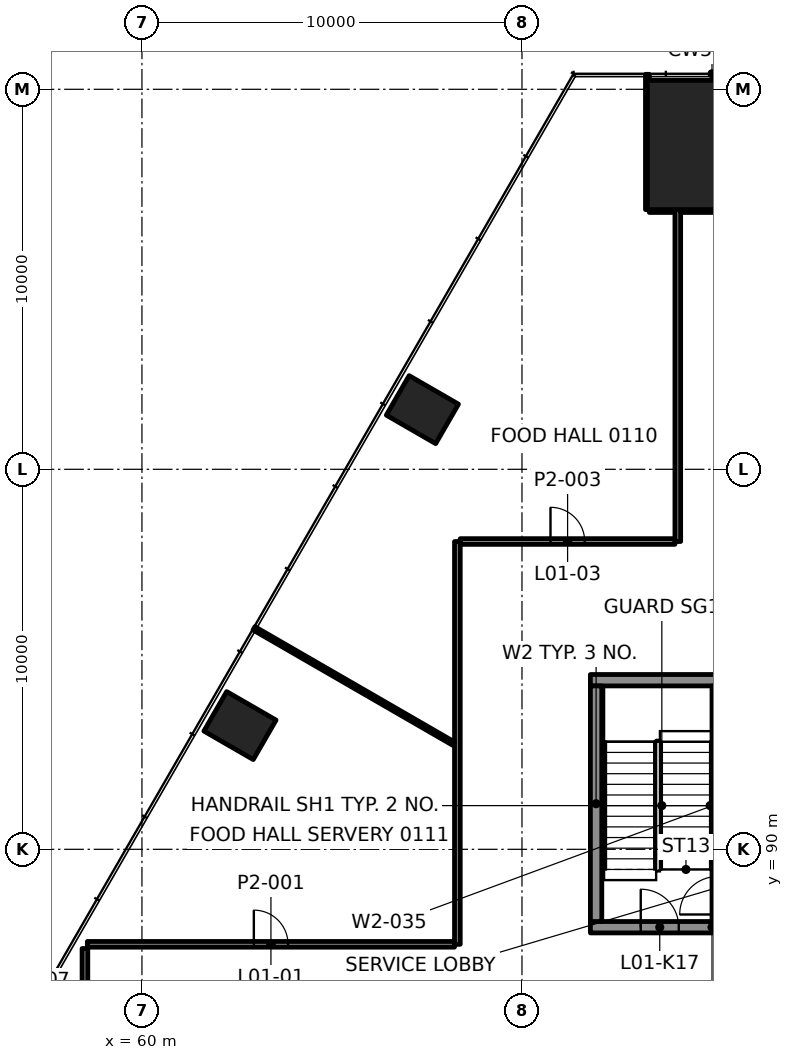
"""IFC4 building model, lengths in metres.
Left out: names, types, materials, properties, quantities, classifications, styles, units other than length and angle.
Written with IfcOpenShell. Run it as: python <this file> out.ifc"""

import sys

from ifc_helpers import new_model, si_unit, direction, frame, frame_2d, origin, origin_2d, place, context, subcontext, project, spatial, rectangle, extrude, element, fill, save


model = new_model("IFC4")
c1 = context("Model", 3, precision=1e-05, world=origin(), true_north=direction((0.0, 1.0)))
c2 = subcontext(c1, "Body", "Model", "MODEL_VIEW")
j1 = project(units=[si_unit("LENGTHUNIT", "METRE"), si_unit("PLANEANGLEUNIT", "RADIAN")], contexts=[c1])
p1 = place(None, origin())
s1 = spatial("IfcSite", under=j1, at=p1, CompositionType="ELEMENT")
p2 = place(p1, origin())
s2 = spatial("IfcBuilding", under=s1, at=p2, CompositionType="ELEMENT")
p3 = place(p2, frame((0.0, 0.0, 8.0)))
s3 = spatial("IfcBuildingStorey", under=s2, at=p3, CompositionType="ELEMENT", Elevation=8.0)
p4 = place(p3, frame((75.0, 108.534, 0.0), z_axis=(0.0, 0.0, 1.0), x_axis=(-1.0, 0.0, 0.0)))
e1 = element("IfcColumn", 1, at=p4, inside=s3, PredefinedType="COLUMN", context=c2, shape_type="SweptSolid", body=[
    extrude(rectangle(XDim=3.4, YDim=3.4, at=origin_2d()), origin(), (0.0, 0.0, 1.0), 4.6),
])
for number, where, z_axis, x_axis in (
    (2, (67.379, 101.57, -0.0), (0.0, 0.0, 1.0), (-0.5, -0.866, 0.0)),
    (3, (62.579, 93.256, -0.0), (0.0, 0.0, 1.0), (-0.5, -0.866, 0.0)),
):
    element("IfcColumn", number, at=place(p3, frame(where, z_axis=z_axis, x_axis=x_axis)), inside=s3, PredefinedType="COLUMN", context=c2, shape_type="SweptSolid", body=[
        extrude(rectangle(XDim=1.2, YDim=1.5, at=origin_2d()), origin(), (0.0, 0.0, 1.0), 4.601),
    ])
p5 = place(p3, frame((71.8, 87.95, 0.0), z_axis=(0.0, 0.0, 1.0), x_axis=(1.0, 0.0, 0.0)))
e4 = element("IfcWall", 4, at=p5, inside=s3, PredefinedType="SHEAR", context=c2, shape_type="SweptSolid", body=[
    extrude(rectangle(XDim=6.4, YDim=0.3, at=frame_2d((3.2, 0.0))), origin(), (0.0, 0.0, 1.0), 4.3),
])
p6 = place(p5, frame((1.325, 0.0, 0.0)))
e5 = element("IfcOpeningElement", 5, at=p6, cuts=e4, PredefinedType="OPENING", context=c2, shape_type="SweptSolid", body=[
    extrude(rectangle(XDim=1.0, YDim=2.1, at=frame_2d((0.5, 1.05))), frame((0.0, 0.16, 0.0), z_axis=(0.0, -1.0, 0.0), x_axis=(1.0, 0.0, 0.0)), (0.0, 0.0, 1.0), 0.32),
])
p7 = place(p5, frame((4.125, 0.0, 0.0)))
e6 = element("IfcOpeningElement", 6, at=p7, cuts=e4, PredefinedType="OPENING", context=c2, shape_type="SweptSolid", body=[
    extrude(rectangle(XDim=1.2, YDim=2.1, at=frame_2d((0.6, 1.05))), frame((0.0, 0.16, 0.0), z_axis=(0.0, -1.0, 0.0), x_axis=(1.0, 0.0, 0.0)), (0.0, 0.0, 1.0), 0.32),
])
p8 = place(p3, frame((71.8, 94.45, 0.0), z_axis=(0.0, 0.0, 1.0), x_axis=(1.0, 0.0, 0.0)))
e7 = element("IfcWall", 7, at=p8, inside=s3, PredefinedType="SHEAR", context=c2, shape_type="SweptSolid", body=[
    extrude(rectangle(XDim=6.4, YDim=0.3, at=frame_2d((3.2, 0.0))), origin(), (0.0, 0.0, 1.0), 4.3),
])
p9 = place(p3, frame((71.95, 88.1, 0.0), z_axis=(0.0, 0.0, 1.0), x_axis=(0.0, 1.0, 0.0)))
e8 = element("IfcWall", 8, at=p9, inside=s3, PredefinedType="SHEAR", context=c2, shape_type="SweptSolid", body=[
    extrude(rectangle(XDim=6.2, YDim=0.3, at=frame_2d((3.1, 0.0))), origin(), (0.0, 0.0, 1.0), 4.3),
])
p10 = place(p3, frame((75.15, 88.1, 0.0), z_axis=(0.0, 0.0, 1.0), x_axis=(0.0, 1.0, 0.0)))
e9 = element("IfcWall", 9, at=p10, inside=s3, PredefinedType="SHEAR", context=c2, shape_type="SweptSolid", body=[
    extrude(rectangle(XDim=6.2, YDim=0.3, at=frame_2d((3.1, 0.0))), origin(), (0.0, 0.0, 1.0), 4.3),
])
p11 = place(p10, frame((0.185, 0.0, 0.0)))
e10 = element("IfcOpeningElement", 10, at=p11, cuts=e9, PredefinedType="OPENING", context=c2, shape_type="SweptSolid", body=[
    extrude(rectangle(XDim=1.0, YDim=2.1, at=frame_2d((0.5, 1.05))), frame((0.0, 0.16, 0.0), z_axis=(0.0, -1.0, 0.0), x_axis=(1.0, 0.0, 0.0)), (0.0, 0.0, 1.0), 0.32),
])
p12 = place(p3, frame((58.563, 87.5, 0.0), z_axis=(0.0, 0.0, 1.0), x_axis=(1.0, 0.0, 0.0)))
e11 = element("IfcWall", 11, at=p12, inside=s3, PredefinedType="PARTITIONING", context=c2, shape_type="SweptSolid", body=[
    extrude(rectangle(XDim=9.662, YDim=0.15, at=frame_2d((4.831, 0.0))), origin(), (0.0, 0.0, 1.0), 3.465),
])
p13 = place(p12, frame((4.381, 0.0, 0.0)))
e12 = element("IfcOpeningElement", 12, at=p13, cuts=e11, PredefinedType="OPENING", context=c2, shape_type="SweptSolid", body=[
    extrude(rectangle(XDim=0.9, YDim=2.1, at=frame_2d((0.45, 1.05))), frame((0.0, 0.085, 0.0), z_axis=(0.0, -1.0, 0.0), x_axis=(1.0, 0.0, 0.0)), (0.0, 0.0, 1.0), 0.17),
])
p14 = place(p3, frame((68.375, 98.1, 0.0), z_axis=(0.0, 0.0, 1.0), x_axis=(1.0, 0.0, 0.0)))
e13 = element("IfcWall", 13, at=p14, inside=s3, PredefinedType="PARTITIONING", context=c2, shape_type="SweptSolid", body=[
    extrude(rectangle(XDim=5.649, YDim=0.15, at=frame_2d((2.825, 0.0))), origin(), (0.0, 0.0, 1.0), 3.7),
])
p15 = place(p14, frame((2.375, 0.0, 0.0)))
e14 = element("IfcOpeningElement", 14, at=p15, cuts=e13, PredefinedType="OPENING", context=c2, shape_type="SweptSolid", body=[
    extrude(rectangle(XDim=0.9, YDim=2.1, at=frame_2d((0.45, 1.05))), frame((0.0, 0.085, 0.0), z_axis=(0.0, -1.0, 0.0), x_axis=(1.0, 0.0, 0.0)), (0.0, 0.0, 1.0), 0.17),
])
p16 = place(p3, frame((73.351, 106.834, 0.0), z_axis=(0.0, 0.0, 1.0), x_axis=(1.0, 0.0, 0.0)))
e15 = element("IfcWall", 15, at=p16, inside=s3, PredefinedType="PARTITIONING", context=c2, shape_type="SweptSolid", body=[
    extrude(rectangle(XDim=0.674, YDim=0.15, at=frame_2d((0.337, 0.0))), origin(), (0.0, 0.0, 1.0), 3.7),
])
p17 = place(p3, frame((74.1, 98.1, 0.0), z_axis=(0.0, 0.0, 1.0), x_axis=(0.0, 1.0, 0.0)))
e16 = element("IfcWall", 16, at=p17, inside=s3, PredefinedType="PARTITIONING", context=c2, shape_type="SweptSolid", body=[
    extrude(rectangle(XDim=8.734, YDim=0.15, at=frame_2d((4.367, 0.0))), origin(), (0.0, 0.0, 1.0), 3.7),
])
p18 = place(p3, frame((73.3, 106.834, 0.0), z_axis=(0.0, 0.0, 1.0), x_axis=(0.0, 1.0, 0.0)))
e17 = element("IfcWall", 17, at=p18, inside=s3, PredefinedType="PARTITIONING", context=c2, shape_type="SweptSolid", body=[
    extrude(rectangle(XDim=3.56, YDim=0.1, at=frame_2d((1.78, 0.0))), origin(), (0.0, 0.0, 1.0), 3.7),
])
p19 = place(p3, frame((68.3, 87.5, 0.0), z_axis=(0.0, 0.0, 1.0), x_axis=(0.0, 1.0, 0.0)))
e18 = element("IfcWall", 18, at=p19, inside=s3, PredefinedType="PARTITIONING", context=c2, shape_type="SweptSolid", body=[
    extrude(rectangle(XDim=10.6, YDim=0.15, at=frame_2d((5.3, 0.0))), origin(), (0.0, 0.0, 1.0), 3.7),
])
p20 = place(p3, frame((58.5, 85.219, 0.0), z_axis=(0.0, 0.0, 1.0), x_axis=(0.0, 1.0, 0.0)))
e19 = element("IfcWall", 19, at=p20, inside=s3, PredefinedType="PARTITIONING", context=c2, shape_type="SweptSolid", body=[
    extrude(rectangle(XDim=2.17, YDim=0.15, at=frame_2d((1.085, 0.0))), origin(), (0.0, 0.0, 1.0), 3.465),
])
p21 = place(p3, frame((68.199, 92.783, 0.0), z_axis=(0.0, 0.0, 1.0), x_axis=(-0.866019294229, 0.500010581911, 0.0)))
e20 = element("IfcWall", 20, at=p21, inside=s3, PredefinedType="PARTITIONING", context=c2, shape_type="SweptSolid", body=[
    extrude(rectangle(XDim=6.063, YDim=0.1, at=frame_2d((3.032, 0.0))), origin(), (0.0, 0.0, 1.0), 3.465),
])
p22 = place(p3, frame((74.175, 106.834, 0.0), z_axis=(0.0, 0.0, 1.0), x_axis=(1.0, 0.0, 0.0)))
e21 = element("IfcWall", 21, at=p22, inside=s3, PredefinedType="PARTITIONING", context=c2, shape_type="SweptSolid", body=[
    extrude(rectangle(XDim=1.649, YDim=0.15, at=frame_2d((0.825, 0.0))), origin(), (0.0, 0.0, 1.0), 3.697),
])
p23 = place(p13, origin())
e22 = element("IfcDoor", 22, at=p23, inside=s3, OperationType="SINGLE_SWING_RIGHT", PredefinedType="DOOR", context=c2, shape_type="SweptSolid", body=[
    extrude(rectangle(XDim=0.9, YDim=2.1, at=frame_2d((0.45, 1.05))), frame((0.0, 0.025, 0.0), z_axis=(0.0, -1.0, 0.0), x_axis=(1.0, 0.0, 0.0)), (0.0, 0.0, 1.0), 0.05),
])
fill(e12, e22)
p24 = place(p15, origin())
e23 = element("IfcDoor", 23, at=p24, inside=s3, OperationType="SINGLE_SWING_LEFT", PredefinedType="DOOR", context=c2, shape_type="SweptSolid", body=[
    extrude(rectangle(XDim=0.9, YDim=2.1, at=frame_2d((0.45, 1.05))), frame((0.0, 0.025, 0.0), z_axis=(0.0, -1.0, 0.0), x_axis=(1.0, 0.0, 0.0)), (0.0, 0.0, 1.0), 0.05),
])
fill(e14, e23)
p25 = place(p6, origin())
e24 = element("IfcDoor", 24, at=p25, inside=s3, OperationType="SINGLE_SWING_RIGHT", PredefinedType="DOOR", context=c2, shape_type="SweptSolid", body=[
    extrude(rectangle(XDim=1.0, YDim=2.1, at=frame_2d((0.5, 1.05))), frame((0.0, 0.025, 0.0), z_axis=(0.0, -1.0, 0.0), x_axis=(1.0, 0.0, 0.0)), (0.0, 0.0, 1.0), 0.05),
])
fill(e5, e24)
save(model, sys.argv[1])
